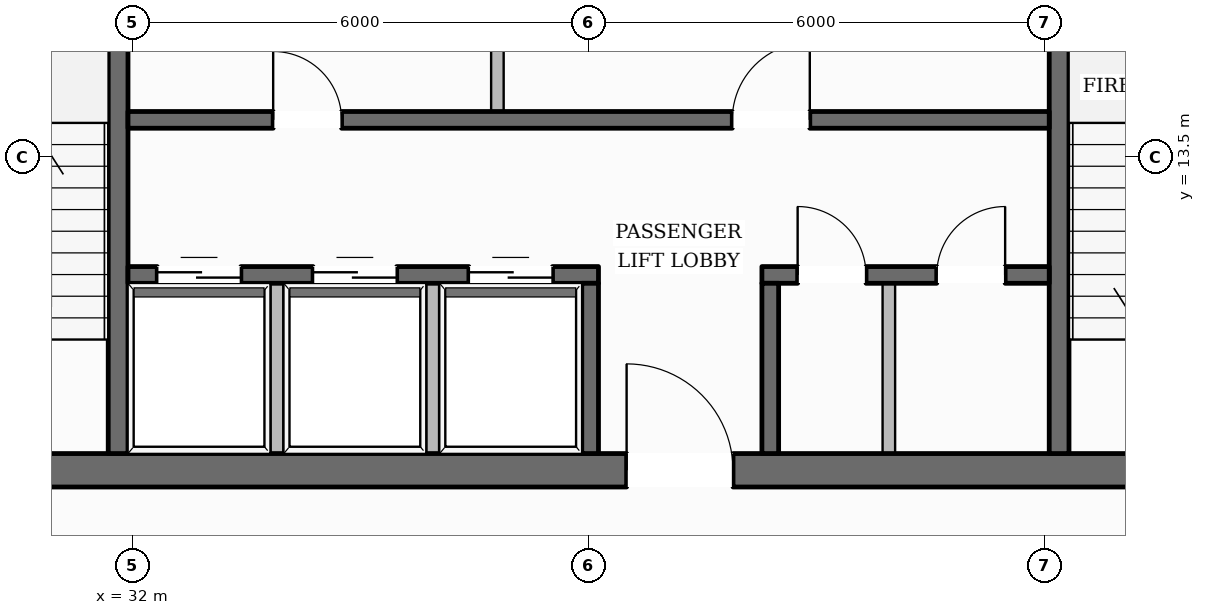
"""IFC4 building model, lengths in metres.
Left out: names, types, materials, properties, quantities, classifications, styles, units other than length and angle.
Written with IfcOpenShell. Run it as: python <this file> out.ifc"""

import sys

from ifc_helpers import new_model, si_unit, direction, frame, frame_2d, origin, place, context, subcontext, project, spatial, rectangle, extrude, element, fill, save


model = new_model("IFC4")
c1 = context("Model", 3, precision=1e-05, world=origin(), true_north=direction((0.0, 1.0)))
c2 = subcontext(c1, "Body", "Model", "MODEL_VIEW")
j1 = project(units=[si_unit("LENGTHUNIT", "METRE"), si_unit("PLANEANGLEUNIT", "RADIAN")], contexts=[c1])
p1 = place(None, origin())
s1 = spatial("IfcSite", under=j1, at=p1, CompositionType="ELEMENT")
p2 = place(p1, origin())
s2 = spatial("IfcBuilding", under=s1, at=p2, CompositionType="ELEMENT")
p3 = place(p2, frame((0.0, 0.0, 215.05)))
s3 = spatial("IfcBuildingStorey", under=s2, at=p3, CompositionType="ELEMENT", Elevation=215.05)
p4 = place(p3, frame((28.04, 9.38, 0.0), z_axis=(0.0, 0.0, 1.0), x_axis=(1.0, 0.0, 0.0)))
e1 = element("IfcWall", 1, at=p4, inside=s3, PredefinedType="SOLIDWALL", context=c2, shape_type="SweptSolid", body=[
    extrude(rectangle(XDim=19.92, YDim=0.44, at=frame_2d((9.96, 0.0))), origin(), (0.0, 0.0, 1.0), 3.6),
])
p5 = place(p4, frame((10.46, 0.0, 0.0)))
e2 = element("IfcOpeningElement", 2, at=p5, cuts=e1, PredefinedType="OPENING", context=c2, shape_type="SweptSolid", body=[
    extrude(rectangle(XDim=1.4, YDim=2.2, at=frame_2d((0.7, 1.1))), frame((0.0, 0.23, 0.0), z_axis=(0.0, -1.0, 0.0), x_axis=(1.0, 0.0, 0.0)), (0.0, 0.0, 1.0), 0.46),
])
p6 = place(p3, frame((31.81, 9.6, 0.0), z_axis=(0.0, 0.0, 1.0), x_axis=(0.0, 1.0, 0.0)))
e3 = element("IfcWall", 3, at=p6, inside=s3, PredefinedType="SHEAR", context=c2, shape_type="SweptSolid", body=[
    extrude(rectangle(XDim=13.0, YDim=0.26, at=frame_2d((6.5, 0.0))), origin(), (0.0, 0.0, 1.0), 3.6),
])
p7 = place(p6, frame((10.925, 0.0, 0.0)))
e4 = element("IfcOpeningElement", 4, at=p7, cuts=e3, PredefinedType="OPENING", context=c2, shape_type="SweptSolid", body=[
    extrude(rectangle(XDim=1.25, YDim=2.25, at=frame_2d((0.625, 1.125))), frame((0.0, 0.14, 0.0), z_axis=(0.0, -1.0, 0.0), x_axis=(1.0, 0.0, 0.0)), (0.0, 0.0, 1.0), 0.28),
])
p8 = place(p3, frame((44.19, 9.6, 0.0), z_axis=(0.0, 0.0, 1.0), x_axis=(0.0, 1.0, 0.0)))
e5 = element("IfcWall", 5, at=p8, inside=s3, PredefinedType="SHEAR", context=c2, shape_type="SweptSolid", body=[
    extrude(rectangle(XDim=13.0, YDim=0.26, at=frame_2d((6.5, 0.0))), origin(), (0.0, 0.0, 1.0), 3.6),
])
p9 = place(p8, frame((10.925, 0.0, 0.0)))
e6 = element("IfcOpeningElement", 6, at=p9, cuts=e5, PredefinedType="OPENING", context=c2, shape_type="SweptSolid", body=[
    extrude(rectangle(XDim=1.25, YDim=2.25, at=frame_2d((0.625, 1.125))), frame((0.0, 0.14, 0.0), z_axis=(0.0, -1.0, 0.0), x_axis=(1.0, 0.0, 0.0)), (0.0, 0.0, 1.0), 0.28),
])
p10 = place(p3, frame((31.94, 13.99, 0.0), z_axis=(0.0, 0.0, 1.0), x_axis=(1.0, 0.0, 0.0)))
e7 = element("IfcWall", 7, at=p10, inside=s3, PredefinedType="SOLIDWALL", context=c2, shape_type="SweptSolid", body=[
    extrude(rectangle(XDim=12.12, YDim=0.22, at=frame_2d((6.06, 0.0))), origin(), (0.0, 0.0, 1.0), 3.6),
])
p11 = place(p10, frame((1.91, 0.0, 0.0)))
e8 = element("IfcOpeningElement", 8, at=p11, cuts=e7, PredefinedType="OPENING", context=c2, shape_type="SweptSolid", body=[
    extrude(rectangle(XDim=0.9, YDim=2.1, at=frame_2d((0.45, 1.05))), frame((0.0, 0.12, 0.0), z_axis=(0.0, -1.0, 0.0), x_axis=(1.0, 0.0, 0.0)), (0.0, 0.0, 1.0), 0.24),
])
p12 = place(p10, frame((7.95, 0.0, 0.0)))
e9 = element("IfcOpeningElement", 9, at=p12, cuts=e7, PredefinedType="OPENING", context=c2, shape_type="SweptSolid", body=[
    extrude(rectangle(XDim=1.02, YDim=2.15, at=frame_2d((0.51, 1.075))), frame((0.0, 0.12, 0.0), z_axis=(0.0, -1.0, 0.0), x_axis=(1.0, 0.0, 0.0)), (0.0, 0.0, 1.0), 0.24),
])
p13 = place(p3, frame((31.94, 11.95, 0.0), z_axis=(0.0, 0.0, 1.0), x_axis=(1.0, 0.0, 0.0)))
e10 = element("IfcWall", 10, at=p13, inside=s3, PredefinedType="SOLIDWALL", context=c2, shape_type="SweptSolid", body=[
    extrude(rectangle(XDim=6.19, YDim=0.22, at=frame_2d((3.095, 0.0))), origin(), (0.0, 0.0, 1.0), 3.6),
])
p14 = place(p13, frame((0.385, 0.0, 0.0)))
e11 = element("IfcOpeningElement", 11, at=p14, cuts=e10, PredefinedType="OPENING", context=c2, shape_type="SweptSolid", body=[
    extrude(rectangle(XDim=1.1, YDim=2.2, at=frame_2d((0.55, 1.1))), frame((0.0, 0.12, 0.0), z_axis=(0.0, -1.0, 0.0), x_axis=(1.0, 0.0, 0.0)), (0.0, 0.0, 1.0), 0.24),
])
p15 = place(p13, frame((2.435, 0.0, 0.0)))
e12 = element("IfcOpeningElement", 12, at=p15, cuts=e10, PredefinedType="OPENING", context=c2, shape_type="SweptSolid", body=[
    extrude(rectangle(XDim=1.1, YDim=2.2, at=frame_2d((0.55, 1.1))), frame((0.0, 0.12, 0.0), z_axis=(0.0, -1.0, 0.0), x_axis=(1.0, 0.0, 0.0)), (0.0, 0.0, 1.0), 0.24),
])
p16 = place(p13, frame((4.485, 0.0, 0.0)))
e13 = element("IfcOpeningElement", 13, at=p16, cuts=e10, PredefinedType="OPENING", context=c2, shape_type="SweptSolid", body=[
    extrude(rectangle(XDim=1.1, YDim=2.2, at=frame_2d((0.55, 1.1))), frame((0.0, 0.12, 0.0), z_axis=(0.0, -1.0, 0.0), x_axis=(1.0, 0.0, 0.0)), (0.0, 0.0, 1.0), 0.24),
])
p17 = place(p3, frame((40.28, 11.95, 0.0), z_axis=(0.0, 0.0, 1.0), x_axis=(1.0, 0.0, 0.0)))
e14 = element("IfcWall", 14, at=p17, inside=s3, PredefinedType="SOLIDWALL", context=c2, shape_type="SweptSolid", body=[
    extrude(rectangle(XDim=3.78, YDim=0.22, at=frame_2d((1.89, 0.0))), origin(), (0.0, 0.0, 1.0), 3.6),
])
p18 = place(p17, frame((0.47, 0.0, 0.0)))
e15 = element("IfcOpeningElement", 15, at=p18, cuts=e14, PredefinedType="OPENING", context=c2, shape_type="SweptSolid", body=[
    extrude(rectangle(XDim=0.9, YDim=2.1, at=frame_2d((0.45, 1.05))), frame((0.0, 0.12, 0.0), z_axis=(0.0, -1.0, 0.0), x_axis=(1.0, 0.0, 0.0)), (0.0, 0.0, 1.0), 0.24),
])
p19 = place(p17, frame((2.3, 0.0, 0.0)))
e16 = element("IfcOpeningElement", 16, at=p19, cuts=e14, PredefinedType="OPENING", context=c2, shape_type="SweptSolid", body=[
    extrude(rectangle(XDim=0.9, YDim=2.1, at=frame_2d((0.45, 1.05))), frame((0.0, 0.12, 0.0), z_axis=(0.0, -1.0, 0.0), x_axis=(1.0, 0.0, 0.0)), (0.0, 0.0, 1.0), 0.24),
])
for number, where, z_axis, x_axis in (
    (17, (38.02, 9.6, 0.0), (0.0, 0.0, 1.0), (0.0, 1.0, 0.0)),
    (18, (40.39, 9.6, 0.0), (0.0, 0.0, 1.0), (0.0, 1.0, 0.0)),
):
    element("IfcWall", number, at=place(p3, frame(where, z_axis=z_axis, x_axis=x_axis)), inside=s3, PredefinedType="SOLIDWALL", context=c2, shape_type="SweptSolid", body=[
        extrude(rectangle(XDim=2.24, YDim=0.22, at=frame_2d((1.12, 0.0))), origin(), (0.0, 0.0, 1.0), 3.6),
    ])
p20 = place(p3, frame((14.13, 10.825, 0.0), z_axis=(0.0, 0.0, 1.0), x_axis=(0.506658543763, 0.862146808863, 0.0)))
e19 = element("IfcWall", 19, at=p20, inside=s3, PredefinedType="STANDARD", context=c2, shape_type="SweptSolid", body=[
    extrude(rectangle(XDim=39.014, YDim=0.35, at=frame_2d((19.507, 0.0))), origin(), (0.0, 0.0, 1.0), 3.132),
])
p21 = place(p20, frame((9.354, 0.0, 0.0)))
e20 = element("IfcOpeningElement", 20, at=p21, cuts=e19, PredefinedType="OPENING", context=c2, shape_type="SweptSolid", body=[
    extrude(rectangle(XDim=1.0, YDim=2.2, at=frame_2d((0.5, 1.1))), frame((0.0, 0.185, 0.0), z_axis=(0.0, -1.0, 0.0), x_axis=(1.0, 0.0, 0.0)), (0.0, 0.0, 1.0), 0.37),
])
p22 = place(p20, frame((34.645, 0.0, 0.65)))
e21 = element("IfcOpeningElement", 21, at=p22, cuts=e19, PredefinedType="OPENING", context=c2, shape_type="SweptSolid", body=[
    extrude(rectangle(XDim=1.45, YDim=1.75, at=frame_2d((0.725, 0.875))), frame((0.0, 0.185, 0.0), z_axis=(0.0, -1.0, 0.0), x_axis=(1.0, 0.0, 0.0)), (0.0, 0.0, 1.0), 0.37),
])
p23 = place(p20, frame((28.301, 0.0, 0.65)))
e22 = element("IfcOpeningElement", 22, at=p23, cuts=e19, PredefinedType="OPENING", context=c2, shape_type="SweptSolid", body=[
    extrude(rectangle(XDim=1.45, YDim=1.75, at=frame_2d((0.725, 0.875))), frame((0.0, 0.185, 0.0), z_axis=(0.0, -1.0, 0.0), x_axis=(1.0, 0.0, 0.0)), (0.0, 0.0, 1.0), 0.37),
])
p24 = place(p20, frame((21.958, 0.0, 0.65)))
e23 = element("IfcOpeningElement", 23, at=p24, cuts=e19, PredefinedType="OPENING", context=c2, shape_type="SweptSolid", body=[
    extrude(rectangle(XDim=1.45, YDim=1.75, at=frame_2d((0.725, 0.875))), frame((0.0, 0.185, 0.0), z_axis=(0.0, -1.0, 0.0), x_axis=(1.0, 0.0, 0.0)), (0.0, 0.0, 1.0), 0.37),
])
p25 = place(p20, frame((2.926, 0.0, 0.65)))
e24 = element("IfcOpeningElement", 24, at=p25, cuts=e19, PredefinedType="OPENING", context=c2, shape_type="SweptSolid", body=[
    extrude(rectangle(XDim=1.45, YDim=1.75, at=frame_2d((0.725, 0.875))), frame((0.0, 0.185, 0.0), z_axis=(0.0, -1.0, 0.0), x_axis=(1.0, 0.0, 0.0)), (0.0, 0.0, 1.0), 0.37),
])
p26 = place(p3, frame((41.969, 44.54, 0.0), z_axis=(0.0, 0.0, 1.0), x_axis=(0.498884596562, -0.866668425243, 0.0)))
e25 = element("IfcWall", 25, at=p26, inside=s3, PredefinedType="STANDARD", context=c2, shape_type="SweptSolid", body=[
    extrude(rectangle(XDim=38.412, YDim=0.35, at=frame_2d((19.206, 0.0))), origin(), (0.0, 0.0, 1.0), 3.132),
])
p27 = place(p26, frame((34.087, 0.0, 0.65)))
e26 = element("IfcOpeningElement", 26, at=p27, cuts=e25, PredefinedType="OPENING", context=c2, shape_type="SweptSolid", body=[
    extrude(rectangle(XDim=1.45, YDim=1.75, at=frame_2d((0.725, 0.875))), frame((0.0, 0.185, 0.0), z_axis=(0.0, -1.0, 0.0), x_axis=(1.0, 0.0, 0.0)), (0.0, 0.0, 1.0), 0.37),
])
p28 = place(p26, frame((27.845, 0.0, 0.65)))
e27 = element("IfcOpeningElement", 27, at=p28, cuts=e25, PredefinedType="OPENING", context=c2, shape_type="SweptSolid", body=[
    extrude(rectangle(XDim=1.45, YDim=1.75, at=frame_2d((0.725, 0.875))), frame((0.0, 0.185, 0.0), z_axis=(0.0, -1.0, 0.0), x_axis=(1.0, 0.0, 0.0)), (0.0, 0.0, 1.0), 0.37),
])
p29 = place(p26, frame((21.603, 0.0, 0.65)))
e28 = element("IfcOpeningElement", 28, at=p29, cuts=e25, PredefinedType="OPENING", context=c2, shape_type="SweptSolid", body=[
    extrude(rectangle(XDim=1.45, YDim=1.75, at=frame_2d((0.725, 0.875))), frame((0.0, 0.185, 0.0), z_axis=(0.0, -1.0, 0.0), x_axis=(1.0, 0.0, 0.0)), (0.0, 0.0, 1.0), 0.37),
])
p30 = place(p26, frame((9.119, 0.0, 0.65)))
e29 = element("IfcOpeningElement", 29, at=p30, cuts=e25, PredefinedType="OPENING", context=c2, shape_type="SweptSolid", body=[
    extrude(rectangle(XDim=1.45, YDim=1.75, at=frame_2d((0.725, 0.875))), frame((0.0, 0.185, 0.0), z_axis=(0.0, -1.0, 0.0), x_axis=(1.0, 0.0, 0.0)), (0.0, 0.0, 1.0), 0.37),
])
p31 = place(p26, frame((2.876, 0.0, 0.65)))
e30 = element("IfcOpeningElement", 30, at=p31, cuts=e25, PredefinedType="OPENING", context=c2, shape_type="SweptSolid", body=[
    extrude(rectangle(XDim=1.45, YDim=1.75, at=frame_2d((0.725, 0.875))), frame((0.0, 0.185, 0.0), z_axis=(0.0, -1.0, 0.0), x_axis=(1.0, 0.0, 0.0)), (0.0, 0.0, 1.0), 0.37),
])
for number, where, z_axis, x_axis in (
    (31, (33.9, 9.52, 0.0), (0.0, 0.0, 1.0), (0.0, 1.0, 0.0)),
    (32, (35.95, 9.52, 0.0), (0.0, 0.0, 1.0), (0.0, 1.0, 0.0)),
):
    element("IfcWall", number, at=place(p3, frame(where, z_axis=z_axis, x_axis=x_axis)), inside=s3, PredefinedType="PARTITIONING", context=c2, shape_type="SweptSolid", body=[
        extrude(rectangle(XDim=2.32, YDim=0.165, at=frame_2d((1.16, 0.0))), origin(), (0.0, 0.0, 1.0), 3.6),
    ])
p32 = place(p3, frame((36.8, 14.1, 0.0), z_axis=(0.0, 0.0, 1.0), x_axis=(0.0, 1.0, 0.0)))
e33 = element("IfcWall", 33, at=p32, inside=s3, PredefinedType="PARTITIONING", context=c2, shape_type="SweptSolid", body=[
    extrude(rectangle(XDim=2.24, YDim=0.165, at=frame_2d((1.12, 0.0))), origin(), (0.0, 0.0, 1.0), 3.6),
])
p33 = place(p3, frame((41.95, 9.52, 0.0), z_axis=(0.0, 0.0, 1.0), x_axis=(0.0, 1.0, 0.0)))
e34 = element("IfcWall", 34, at=p33, inside=s3, PredefinedType="PARTITIONING", context=c2, shape_type="SweptSolid", body=[
    extrude(rectangle(XDim=2.32, YDim=0.165, at=frame_2d((1.16, 0.0))), origin(), (0.0, 0.0, 1.0), 3.6),
])
p34 = place(p5, origin())
e35 = element("IfcDoor", 35, at=p34, inside=s3, OperationType="SINGLE_SWING_LEFT", PredefinedType="DOOR", context=c2, shape_type="SweptSolid", body=[
    extrude(rectangle(XDim=1.4, YDim=2.2, at=frame_2d((0.7, 1.1))), frame((0.0, 0.025, 0.0), z_axis=(0.0, -1.0, 0.0), x_axis=(1.0, 0.0, 0.0)), (0.0, 0.0, 1.0), 0.05),
])
fill(e2, e35)
p35 = place(p14, origin())
e36 = element("IfcDoor", 36, at=p35, inside=s3, OperationType="DOUBLE_DOOR_SLIDING", PredefinedType="DOOR", context=c2, shape_type="SweptSolid", body=[
    extrude(rectangle(XDim=1.1, YDim=2.2, at=frame_2d((0.55, 1.1))), frame((0.0, 0.025, 0.0), z_axis=(0.0, -1.0, 0.0), x_axis=(1.0, 0.0, 0.0)), (0.0, 0.0, 1.0), 0.05),
])
fill(e11, e36)
p36 = place(p15, origin())
e37 = element("IfcDoor", 37, at=p36, inside=s3, OperationType="DOUBLE_DOOR_SLIDING", PredefinedType="DOOR", context=c2, shape_type="SweptSolid", body=[
    extrude(rectangle(XDim=1.1, YDim=2.2, at=frame_2d((0.55, 1.1))), frame((0.0, 0.025, 0.0), z_axis=(0.0, -1.0, 0.0), x_axis=(1.0, 0.0, 0.0)), (0.0, 0.0, 1.0), 0.05),
])
fill(e12, e37)
p37 = place(p16, origin())
e38 = element("IfcDoor", 38, at=p37, inside=s3, OperationType="DOUBLE_DOOR_SLIDING", PredefinedType="DOOR", context=c2, shape_type="SweptSolid", body=[
    extrude(rectangle(XDim=1.1, YDim=2.2, at=frame_2d((0.55, 1.1))), frame((0.0, 0.025, 0.0), z_axis=(0.0, -1.0, 0.0), x_axis=(1.0, 0.0, 0.0)), (0.0, 0.0, 1.0), 0.05),
])
fill(e13, e38)
p38 = place(p11, origin())
e39 = element("IfcDoor", 39, at=p38, inside=s3, OperationType="SINGLE_SWING_LEFT", PredefinedType="DOOR", context=c2, shape_type="SweptSolid", body=[
    extrude(rectangle(XDim=0.9, YDim=2.1, at=frame_2d((0.45, 1.05))), frame((0.0, 0.025, 0.0), z_axis=(0.0, -1.0, 0.0), x_axis=(1.0, 0.0, 0.0)), (0.0, 0.0, 1.0), 0.05),
])
fill(e8, e39)
p39 = place(p12, origin())
e40 = element("IfcDoor", 40, at=p39, inside=s3, OperationType="SINGLE_SWING_RIGHT", PredefinedType="DOOR", context=c2, shape_type="SweptSolid", body=[
    extrude(rectangle(XDim=1.02, YDim=2.15, at=frame_2d((0.51, 1.075))), frame((0.0, 0.025, 0.0), z_axis=(0.0, -1.0, 0.0), x_axis=(1.0, 0.0, 0.0)), (0.0, 0.0, 1.0), 0.05),
])
fill(e9, e40)
p40 = place(p18, origin())
e41 = element("IfcDoor", 41, at=p40, inside=s3, OperationType="SINGLE_SWING_LEFT", PredefinedType="DOOR", context=c2, shape_type="SweptSolid", body=[
    extrude(rectangle(XDim=0.9, YDim=2.1, at=frame_2d((0.45, 1.05))), frame((0.0, 0.025, 0.0), z_axis=(0.0, -1.0, 0.0), x_axis=(1.0, 0.0, 0.0)), (0.0, 0.0, 1.0), 0.05),
])
fill(e15, e41)
p41 = place(p19, origin())
e42 = element("IfcDoor", 42, at=p41, inside=s3, OperationType="SINGLE_SWING_RIGHT", PredefinedType="DOOR", context=c2, shape_type="SweptSolid", body=[
    extrude(rectangle(XDim=0.9, YDim=2.1, at=frame_2d((0.45, 1.05))), frame((0.0, 0.025, 0.0), z_axis=(0.0, -1.0, 0.0), x_axis=(1.0, 0.0, 0.0)), (0.0, 0.0, 1.0), 0.05),
])
fill(e16, e42)
save(model, sys.argv[1])
